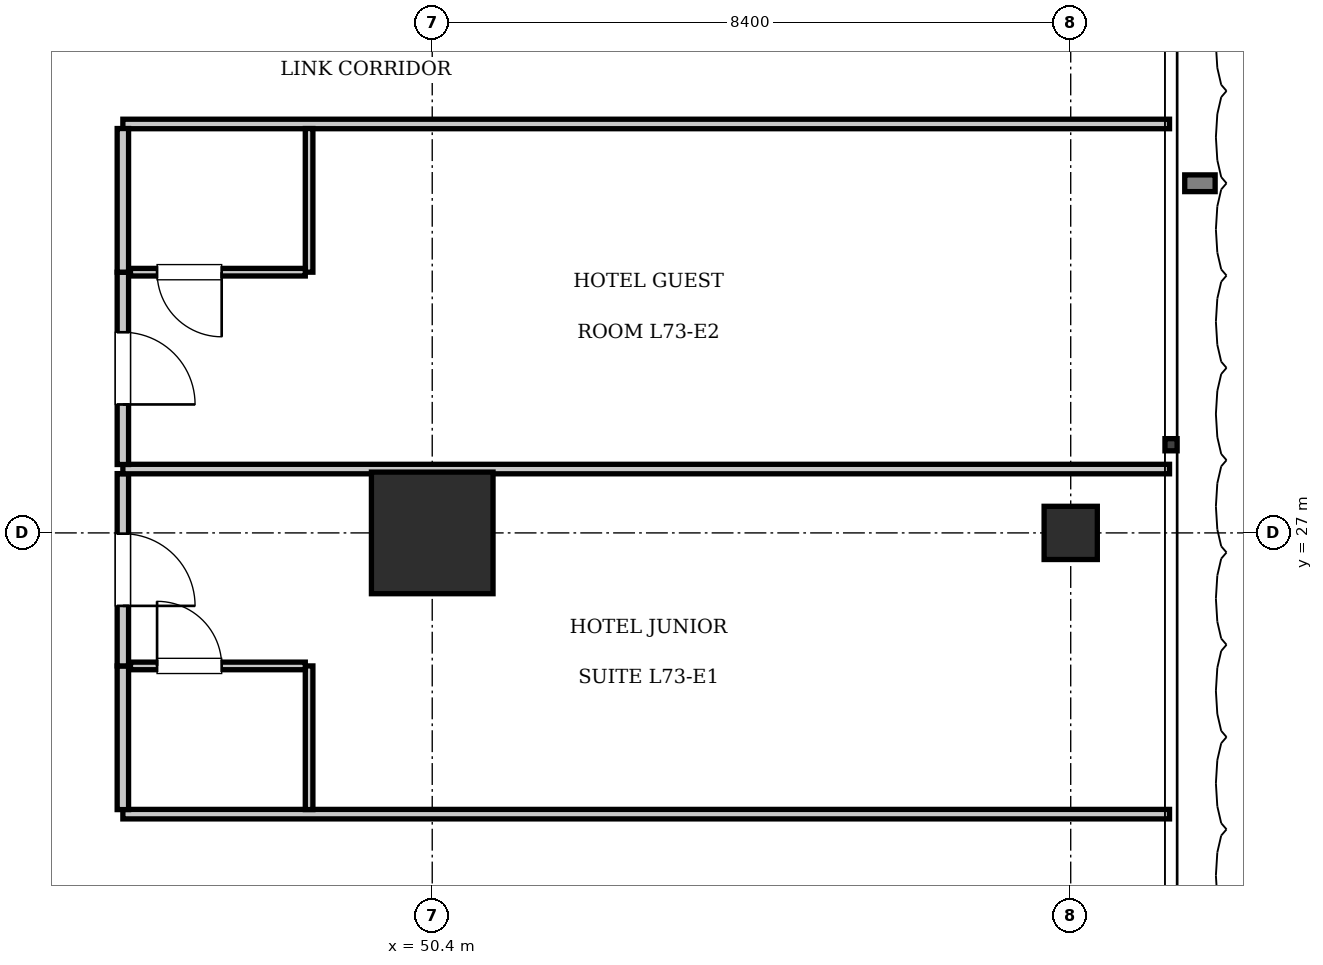
"""IFC4 building model, lengths in metres.
Left out: names, types, materials, properties, quantities, classifications, styles, units other than length and angle.
Written with IfcOpenShell. Run it as: python <this file> out.ifc"""

import sys

from ifc_helpers import new_model, si_unit, direction, frame, frame_2d, origin, origin_2d, place, context, subcontext, project, spatial, rectangle, extrude, element, fill, save


model = new_model("IFC4")
c1 = context("Model", 3, precision=1e-05, world=origin(), true_north=direction((0.0, 1.0)))
c2 = subcontext(c1, "Body", "Model", "MODEL_VIEW")
j1 = project(units=[si_unit("LENGTHUNIT", "METRE"), si_unit("PLANEANGLEUNIT", "RADIAN")], contexts=[c1])
p1 = place(None, origin())
s1 = spatial("IfcSite", under=j1, at=p1, CompositionType="ELEMENT")
p2 = place(p1, origin())
s2 = spatial("IfcBuilding", under=s1, at=p2, CompositionType="ELEMENT")
p3 = place(p2, frame((0.0, 0.0, 297.15)))
s3 = spatial("IfcBuildingStorey", under=s2, at=p3, CompositionType="ELEMENT", Elevation=297.15)
p4 = place(p3, frame((50.4, 27.0, 0.0), z_axis=(0.0, 0.0, 1.0), x_axis=(1.0, 0.0, 0.0)))
e1 = element("IfcColumn", 1, at=p4, inside=s3, PredefinedType="COLUMN", context=c2, shape_type="SweptSolid", body=[
    extrude(rectangle(XDim=1.6, YDim=1.6, at=origin_2d()), origin(), (0.0, 0.0, 1.0), 3.85),
])
p5 = place(p3, frame((58.8, 27.0, 0.0), z_axis=(0.0, 0.0, 1.0), x_axis=(1.0, 0.0, 0.0)))
e2 = element("IfcColumn", 2, at=p5, inside=s3, PredefinedType="COLUMN", context=c2, shape_type="SweptSolid", body=[
    extrude(rectangle(XDim=0.7, YDim=0.7, at=origin_2d()), origin(), (0.0, 0.0, 1.0), 3.85),
])
for number, where, z_axis, x_axis in (
    (3, (46.33, 23.3, 0.0), (0.0, 0.0, 1.0), (1.0, 0.0, 0.0)),
    (4, (46.33, 32.38, 0.0), (0.0, 0.0, 1.0), (1.0, 0.0, 0.0)),
):
    element("IfcWall", number, at=place(p3, frame(where, z_axis=z_axis, x_axis=x_axis)), inside=s3, PredefinedType="PARTITIONING", context=c2, shape_type="SweptSolid", body=[
        extrude(rectangle(XDim=13.77, YDim=0.125, at=frame_2d((6.885, 0.0))), origin(), (0.0, 0.0, 1.0), 3.61),
    ])
p6 = place(p3, frame((46.33, 23.36, 0.0), z_axis=(0.0, 0.0, 1.0), x_axis=(0.0, 1.0, 0.0)))
e5 = element("IfcWall", 5, at=p6, inside=s3, PredefinedType="PARTITIONING", context=c2, shape_type="SweptSolid", body=[
    extrude(rectangle(XDim=1.89, YDim=0.15, at=frame_2d((0.945, 0.0))), origin(), (0.0, 0.0, 1.0), 3.61),
])
p7 = place(p3, frame((46.33, 25.25, 0.0), z_axis=(0.0, 0.0, 1.0), x_axis=(0.0, 1.0, 0.0)))
e6 = element("IfcWall", 6, at=p7, inside=s3, PredefinedType="PARTITIONING", context=c2, shape_type="SweptSolid", body=[
    extrude(rectangle(XDim=2.53, YDim=0.15, at=frame_2d((1.265, 0.0))), origin(), (0.0, 0.0, 1.0), 3.61),
])
p8 = place(p7, frame((0.79, 0.0, 0.0)))
e7 = element("IfcOpeningElement", 7, at=p8, cuts=e6, PredefinedType="OPENING", context=c2, shape_type="SweptSolid", body=[
    extrude(rectangle(XDim=0.95, YDim=2.15, at=frame_2d((0.475, 1.075))), frame((0.0, 0.085, 0.0), z_axis=(0.0, -1.0, 0.0), x_axis=(1.0, 0.0, 0.0)), (0.0, 0.0, 1.0), 0.17),
])
p9 = place(p3, frame((48.78, 23.36, 0.0), z_axis=(0.0, 0.0, 1.0), x_axis=(0.0, 1.0, 0.0)))
e8 = element("IfcWall", 8, at=p9, inside=s3, PredefinedType="PARTITIONING", context=c2, shape_type="SweptSolid", body=[
    extrude(rectangle(XDim=1.89, YDim=0.1, at=frame_2d((0.945, 0.0))), origin(), (0.0, 0.0, 1.0), 3.61),
])
p10 = place(p3, frame((46.43, 25.25, 0.0), z_axis=(0.0, 0.0, 1.0), x_axis=(1.0, 0.0, 0.0)))
e9 = element("IfcWall", 9, at=p10, inside=s3, PredefinedType="PARTITIONING", context=c2, shape_type="SweptSolid", body=[
    extrude(rectangle(XDim=2.3, YDim=0.1, at=frame_2d((1.15, 0.0))), origin(), (0.0, 0.0, 1.0), 3.61),
])
p11 = place(p10, frame((0.35, 0.0, 0.0)))
e10 = element("IfcOpeningElement", 10, at=p11, cuts=e9, PredefinedType="OPENING", context=c2, shape_type="SweptSolid", body=[
    extrude(rectangle(XDim=0.85, YDim=2.1, at=frame_2d((0.425, 1.05))), frame((0.0, 0.06, 0.0), z_axis=(0.0, -1.0, 0.0), x_axis=(1.0, 0.0, 0.0)), (0.0, 0.0, 1.0), 0.12),
])
p12 = place(p3, frame((46.33, 27.84, 0.0), z_axis=(0.0, 0.0, 1.0), x_axis=(1.0, 0.0, 0.0)))
e11 = element("IfcWall", 11, at=p12, inside=s3, PredefinedType="PARTITIONING", context=c2, shape_type="SweptSolid", body=[
    extrude(rectangle(XDim=13.77, YDim=0.125, at=frame_2d((6.885, 0.0))), origin(), (0.0, 0.0, 1.0), 3.61),
])
p13 = place(p3, frame((46.33, 27.9, 0.0), z_axis=(0.0, 0.0, 1.0), x_axis=(0.0, 1.0, 0.0)))
e12 = element("IfcWall", 12, at=p13, inside=s3, PredefinedType="PARTITIONING", context=c2, shape_type="SweptSolid", body=[
    extrude(rectangle(XDim=2.53, YDim=0.15, at=frame_2d((1.265, 0.0))), origin(), (0.0, 0.0, 1.0), 3.61),
])
p14 = place(p13, frame((0.79, 0.0, 0.0)))
e13 = element("IfcOpeningElement", 13, at=p14, cuts=e12, PredefinedType="OPENING", context=c2, shape_type="SweptSolid", body=[
    extrude(rectangle(XDim=0.95, YDim=2.15, at=frame_2d((0.475, 1.075))), frame((0.0, 0.085, 0.0), z_axis=(0.0, -1.0, 0.0), x_axis=(1.0, 0.0, 0.0)), (0.0, 0.0, 1.0), 0.17),
])
p15 = place(p3, frame((46.33, 30.43, 0.0), z_axis=(0.0, 0.0, 1.0), x_axis=(0.0, 1.0, 0.0)))
e14 = element("IfcWall", 14, at=p15, inside=s3, PredefinedType="PARTITIONING", context=c2, shape_type="SweptSolid", body=[
    extrude(rectangle(XDim=1.89, YDim=0.15, at=frame_2d((0.945, 0.0))), origin(), (0.0, 0.0, 1.0), 3.61),
])
p16 = place(p3, frame((48.78, 30.43, 0.0), z_axis=(0.0, 0.0, 1.0), x_axis=(0.0, 1.0, 0.0)))
e15 = element("IfcWall", 15, at=p16, inside=s3, PredefinedType="PARTITIONING", context=c2, shape_type="SweptSolid", body=[
    extrude(rectangle(XDim=1.89, YDim=0.1, at=frame_2d((0.945, 0.0))), origin(), (0.0, 0.0, 1.0), 3.61),
])
p17 = place(p3, frame((46.43, 30.43, 0.0), z_axis=(0.0, 0.0, 1.0), x_axis=(1.0, 0.0, 0.0)))
e16 = element("IfcWall", 16, at=p17, inside=s3, PredefinedType="PARTITIONING", context=c2, shape_type="SweptSolid", body=[
    extrude(rectangle(XDim=2.3, YDim=0.1, at=frame_2d((1.15, 0.0))), origin(), (0.0, 0.0, 1.0), 3.61),
])
p18 = place(p17, frame((0.35, 0.0, 0.0)))
e17 = element("IfcOpeningElement", 17, at=p18, cuts=e16, PredefinedType="OPENING", context=c2, shape_type="SweptSolid", body=[
    extrude(rectangle(XDim=0.85, YDim=2.1, at=frame_2d((0.425, 1.05))), frame((0.0, 0.06, 0.0), z_axis=(0.0, -1.0, 0.0), x_axis=(1.0, 0.0, 0.0)), (0.0, 0.0, 1.0), 0.12),
])
p19 = place(p11, origin())
e18 = element("IfcDoor", 18, at=p19, inside=s3, OperationType="SINGLE_SWING_LEFT", PredefinedType="DOOR", context=c2, shape_type="SweptSolid", body=[
    extrude(rectangle(XDim=0.85, YDim=2.1, at=frame_2d((0.425, 1.05))), frame((0.0, 0.025, 0.0), z_axis=(0.0, -1.0, 0.0), x_axis=(1.0, 0.0, 0.0)), (0.0, 0.0, 1.0), 0.05),
])
fill(e10, e18)
p20 = place(p8, frame((0.95, 0.0, 0.0), z_axis=(0.0, 0.0, 1.0), x_axis=(-1.0, 0.0, 0.0)))
e19 = element("IfcDoor", 19, at=p20, inside=s3, OperationType="SINGLE_SWING_RIGHT", PredefinedType="DOOR", context=c2, shape_type="SweptSolid", body=[
    extrude(rectangle(XDim=0.95, YDim=2.15, at=frame_2d((0.475, 1.075))), frame((0.0, 0.025, 0.0), z_axis=(0.0, -1.0, 0.0), x_axis=(1.0, 0.0, 0.0)), (0.0, 0.0, 1.0), 0.05),
])
fill(e7, e19)
p21 = place(p18, frame((0.85, 0.0, 0.0), z_axis=(0.0, 0.0, 1.0), x_axis=(-1.0, 0.0, 0.0)))
e20 = element("IfcDoor", 20, at=p21, inside=s3, OperationType="SINGLE_SWING_LEFT", PredefinedType="DOOR", context=c2, shape_type="SweptSolid", body=[
    extrude(rectangle(XDim=0.85, YDim=2.1, at=frame_2d((0.425, 1.05))), frame((0.0, 0.025, 0.0), z_axis=(0.0, -1.0, 0.0), x_axis=(1.0, 0.0, 0.0)), (0.0, 0.0, 1.0), 0.05),
])
fill(e17, e20)
p22 = place(p14, frame((0.95, 0.0, 0.0), z_axis=(0.0, 0.0, 1.0), x_axis=(-1.0, 0.0, 0.0)))
e21 = element("IfcDoor", 21, at=p22, inside=s3, OperationType="SINGLE_SWING_RIGHT", PredefinedType="DOOR", context=c2, shape_type="SweptSolid", body=[
    extrude(rectangle(XDim=0.95, YDim=2.15, at=frame_2d((0.475, 1.075))), frame((0.0, 0.025, 0.0), z_axis=(0.0, -1.0, 0.0), x_axis=(1.0, 0.0, 0.0)), (0.0, 0.0, 1.0), 0.05),
])
fill(e13, e21)
save(model, sys.argv[1])
